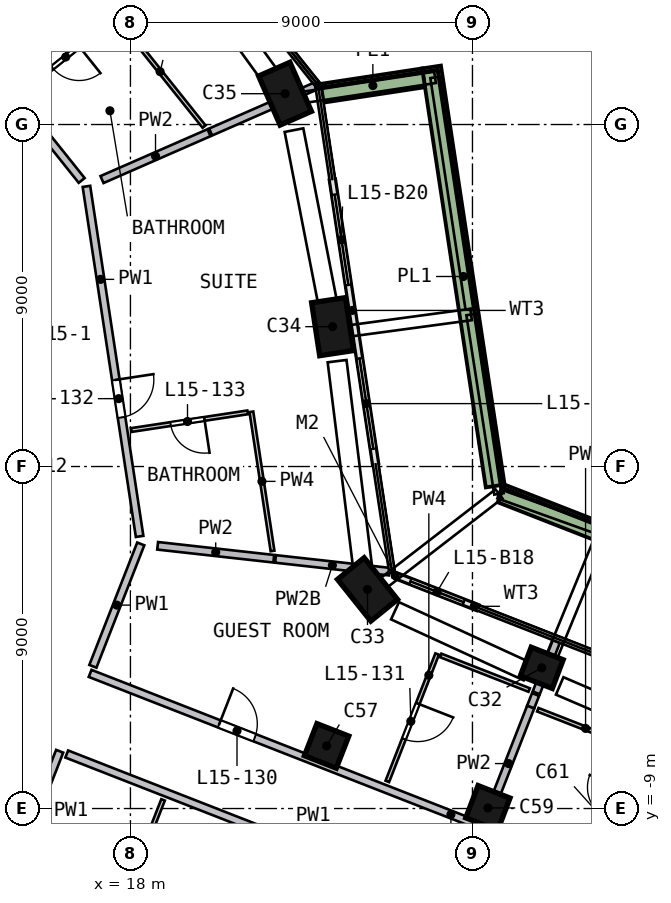
"""IFC4 building model, lengths in metres.
Left out: names, types, materials, properties, quantities, classifications, styles, units other than length and angle.
Written with IfcOpenShell. Run it as: python <this file> out.ifc"""

import sys

from ifc_helpers import new_model, si_unit, direction, frame, frame_2d, origin, origin_2d, place, context, subcontext, project, spatial, rectangle, extrude, element, fill, save


model = new_model("IFC4")
c1 = context("Model", 3, precision=1e-05, world=origin(), true_north=direction((0.0, 1.0)))
c2 = subcontext(c1, "Body", "Model", "MODEL_VIEW")
j1 = project(units=[si_unit("LENGTHUNIT", "METRE"), si_unit("PLANEANGLEUNIT", "RADIAN")], contexts=[c1])
p1 = place(None, origin())
s1 = spatial("IfcSite", under=j1, at=p1, CompositionType="ELEMENT")
p2 = place(p1, origin())
s2 = spatial("IfcBuilding", under=s1, at=p2, CompositionType="ELEMENT")
p3 = place(p2, frame((0.0, 0.0, 68.0)))
s3 = spatial("IfcBuildingStorey", under=s2, at=p3, CompositionType="ELEMENT", Elevation=68.0)
p4 = place(p3, frame((28.861, -5.489, 0.0), z_axis=(-0.030445747, 0.15713934, 0.987107028), x_axis=(-0.932085044, 0.352171112, -0.084811433)))
e1 = element("IfcColumn", 1, at=p4, inside=s3, PredefinedType="COLUMN", context=c2, shape_type="SweptSolid", body=[
    extrude(rectangle(XDim=0.9, YDim=0.8, at=origin_2d()), origin(), (0.0, 0.0, 1.0), 3.232),
])
p5 = place(p3, frame((24.22, -3.373, 0.0), z_axis=(0.015051015, 0.115315096, 0.993214929), x_axis=(0.627855861, -0.774169148, 0.08036883)))
e2 = element("IfcColumn", 2, at=p5, inside=s3, PredefinedType="COLUMN", context=c2, shape_type="SweptSolid", body=[
    extrude(rectangle(XDim=1.4, YDim=0.9, at=origin_2d()), origin(), (0.0, 0.0, 1.0), 3.212),
])
p6 = place(p3, frame((23.34, 3.547, 0.0), z_axis=(-0.01779579, 0.110881458, 0.993674299), x_axis=(-0.149132846, 0.982419922, -0.112296444)))
e3 = element("IfcColumn", 3, at=p6, inside=s3, PredefinedType="COLUMN", context=c2, shape_type="SweptSolid", body=[
    extrude(rectangle(XDim=1.4, YDim=0.9, at=origin_2d()), origin(), (0.0, 0.0, 1.0), 3.21),
])
p7 = place(p3, frame((22.125, 9.684, 0.0), z_axis=(-0.046909277, 0.104842615, 0.993381873), x_axis=(0.397994334, -0.910169761, 0.114854325)))
e4 = element("IfcColumn", 4, at=p7, inside=s3, PredefinedType="COLUMN", context=c2, shape_type="SweptSolid", body=[
    extrude(rectangle(XDim=1.4, YDim=0.9, at=origin_2d()), origin(), (0.0, 0.0, 1.0), 3.211),
])
p8 = place(p3, frame((23.12, -7.485, 0.0), z_axis=(0.034665953, 0.110231649, 0.993301191), x_axis=(0.931623603, -0.363340739, 0.007808335)))
e5 = element("IfcColumn", 5, at=p8, inside=s3, PredefinedType="COLUMN", context=c2, shape_type="SweptSolid", body=[
    extrude(rectangle(XDim=0.9, YDim=0.9, at=origin_2d()), origin(), (0.0, 0.0, 1.0), 3.211),
])
p9 = place(p3, frame((27.422, -9.167, 0.0), z_axis=(-0.013088107, 0.150702368, 0.988492538), x_axis=(0.932639071, -0.354645167, 0.066416633)))
e6 = element("IfcColumn", 6, at=p9, inside=s3, PredefinedType="COLUMN", context=c2, shape_type="SweptSolid", body=[
    extrude(rectangle(XDim=0.9, YDim=0.9, at=origin_2d()), origin(), (0.0, 0.0, 1.0), 3.227),
])
p10 = place(p3, frame((27.139, -3.715, 0.0), z_axis=(0.0, 0.0, 1.0), x_axis=(-0.931325758, 0.364187221, 0.0)))
e7 = element("IfcWall", 7, at=p10, inside=s3, PredefinedType="SOLIDWALL", context=c2, shape_type="SweptSolid", body=[
    extrude(rectangle(XDim=2.3, YDim=0.15, at=frame_2d((1.15, 0.0))), origin(), (0.0, 0.0, 1.0), 2.425),
])
p11 = place(p10, frame((0.4, 0.0, 0.0)))
e8 = element("IfcOpeningElement", 8, at=p11, cuts=e7, PredefinedType="OPENING", context=c2, shape_type="SweptSolid", body=[
    extrude(rectangle(XDim=1.5, YDim=2.4, at=frame_2d((0.75, 1.2))), frame((0.0, 0.085, 0.0), z_axis=(0.0, -1.0, 0.0), x_axis=(1.0, 0.0, 0.0)), (0.0, 0.0, 1.0), 0.17),
])
p12 = place(p3, frame((24.45, 0.074, 0.0), z_axis=(0.0, 0.0, 1.0), x_axis=(-0.150207135, 0.988654549, 0.0)))
e9 = element("IfcWall", 9, at=p12, inside=s3, PredefinedType="SOLIDWALL", context=c2, shape_type="SweptSolid", body=[
    extrude(rectangle(XDim=3.6, YDim=0.15, at=frame_2d((1.8, 0.0))), origin(), (0.0, 0.0, 1.0), 2.425),
])
p13 = place(p12, frame((0.4, 0.0, 0.0)))
e10 = element("IfcOpeningElement", 10, at=p13, cuts=e9, PredefinedType="OPENING", context=c2, shape_type="SweptSolid", body=[
    extrude(rectangle(XDim=2.4, YDim=2.4, at=frame_2d((1.2, 1.2))), frame((0.0, 0.085, 0.0), z_axis=(0.0, -1.0, 0.0), x_axis=(1.0, 0.0, 0.0)), (0.0, 0.0, 1.0), 0.17),
])
p14 = place(p3, frame((23.909, 3.633, 0.0), z_axis=(0.0, 0.0, 1.0), x_axis=(-0.150227192, 0.988651501, 0.0)))
e11 = element("IfcWall", 11, at=p14, inside=s3, PredefinedType="SOLIDWALL", context=c2, shape_type="SweptSolid", body=[
    extrude(rectangle(XDim=3.96, YDim=0.15, at=frame_2d((1.98, 0.0))), origin(), (0.0, 0.0, 1.0), 2.425),
])
p15 = place(p14, frame((1.16, 0.0, 0.0)))
e12 = element("IfcOpeningElement", 12, at=p15, cuts=e11, PredefinedType="OPENING", context=c2, shape_type="SweptSolid", body=[
    extrude(rectangle(XDim=2.4, YDim=2.4, at=frame_2d((1.2, 1.2))), frame((0.0, 0.085, 0.0), z_axis=(0.0, -1.0, 0.0), x_axis=(1.0, 0.0, 0.0)), (0.0, 0.0, 1.0), 0.17),
])
p16 = place(p3, frame((34.172, -3.217, 0.0), z_axis=(0.0, 0.0, 1.0), x_axis=(-0.931303408, 0.364244371, 0.0)))
e13 = element("IfcWall", 13, at=p16, inside=s3, PredefinedType="SOLIDWALL", context=c2, shape_type="SweptSolid", body=[
    extrude(rectangle(XDim=6.89, YDim=0.5, at=frame_2d((3.445, 0.0))), origin(), (0.0, 0.0, 1.0), 0.7),
])
p17 = place(p3, frame((27.598, -0.512, 0.0), z_axis=(0.0, 0.0, 1.0), x_axis=(-0.150217802, 0.988652928, 0.0)))
e14 = element("IfcWall", 14, at=p17, inside=s3, PredefinedType="SOLIDWALL", context=c2, shape_type="SweptSolid", body=[
    extrude(rectangle(XDim=11.152, YDim=0.5, at=frame_2d((5.576, 0.0))), origin(), (0.0, 0.0, 1.0), 0.7),
])
p18 = place(p3, frame((25.713, 10.229, 0.0), z_axis=(0.0, 0.0, 1.0), x_axis=(-0.988647191, -0.150255557, 0.0)))
e15 = element("IfcWall", 15, at=p18, inside=s3, PredefinedType="SOLIDWALL", context=c2, shape_type="SweptSolid", body=[
    extrude(rectangle(XDim=2.699, YDim=0.5, at=frame_2d((1.349, 0.0))), origin(), (0.0, 0.0, 1.0), 0.7),
])
p19 = place(p3, frame((10.9, 14.805, 0.0), z_axis=(0.0, 0.0, 1.0), x_axis=(0.624423357, -0.781086085, 0.0)))
e16 = element("IfcWall", 16, at=p19, inside=s3, PredefinedType="SOLIDWALL", context=c2, shape_type="SweptSolid", body=[
    extrude(rectangle(XDim=9.316, YDim=0.2, at=frame_2d((4.658, 0.0))), origin(), (0.0, 0.0, 1.0), 3.19),
])
p20 = place(p19, frame((5.15, 0.0, 0.0)))
e17 = element("IfcOpeningElement", 17, at=p20, cuts=e16, PredefinedType="OPENING", context=c2, shape_type="SweptSolid", body=[
    extrude(rectangle(XDim=1.0, YDim=2.1, at=frame_2d((0.5, 1.05))), frame((0.0, 0.11, 0.0), z_axis=(0.0, -1.0, 0.0), x_axis=(1.0, 0.0, 0.0)), (0.0, 0.0, 1.0), 0.22),
])
p21 = place(p3, frame((14.899, -10.659, 0.0), z_axis=(0.0, 0.0, 1.0), x_axis=(0.364261269, 0.931296799, 0.0)))
e18 = element("IfcWall", 18, at=p21, inside=s3, PredefinedType="SOLIDWALL", context=c2, shape_type="SweptSolid", body=[
    extrude(rectangle(XDim=3.4, YDim=0.2, at=frame_2d((1.7, 0.0))), origin(), (0.0, 0.0, 1.0), 3.19),
])
p22 = place(p3, frame((16.842, 7.372, 0.0), z_axis=(0.0, 0.0, 1.0), x_axis=(0.150231533, -0.988650842, 0.0)))
e19 = element("IfcWall", 19, at=p22, inside=s3, PredefinedType="SOLIDWALL", context=c2, shape_type="SweptSolid", body=[
    extrude(rectangle(XDim=9.317, YDim=0.2, at=frame_2d((4.658, 0.0))), origin(), (0.0, 0.0, 1.0), 3.19),
])
p23 = place(p22, frame((5.15, 0.0, 0.0)))
e20 = element("IfcOpeningElement", 20, at=p23, cuts=e19, PredefinedType="OPENING", context=c2, shape_type="SweptSolid", body=[
    extrude(rectangle(XDim=1.0, YDim=2.1, at=frame_2d((0.5, 1.05))), frame((0.0, 0.11, 0.0), z_axis=(0.0, -1.0, 0.0), x_axis=(1.0, 0.0, 0.0)), (0.0, 0.0, 1.0), 0.22),
])
p24 = place(p3, frame((17.012, -5.257, 0.0), z_axis=(0.0, 0.0, 1.0), x_axis=(0.364210349, 0.931316714, 0.0)))
e21 = element("IfcWall", 21, at=p24, inside=s3, PredefinedType="SOLIDWALL", context=c2, shape_type="SweptSolid", body=[
    extrude(rectangle(XDim=3.458, YDim=0.2, at=frame_2d((1.729, 0.0))), origin(), (0.0, 0.0, 1.0), 3.19),
])
p25 = place(p3, frame((30.795, -13.225, 0.0), z_axis=(0.0, 0.0, 1.0), x_axis=(-0.931306749, 0.364235828, 0.0)))
e22 = element("IfcWall", 22, at=p25, inside=s3, PredefinedType="SOLIDWALL", context=c2, shape_type="SweptSolid", body=[
    extrude(rectangle(XDim=15.538, YDim=0.2, at=frame_2d((7.769, 0.0))), origin(), (0.0, 0.0, 1.0), 3.19),
])
p26 = place(p25, frame((1.8, 0.0, 0.0)))
e23 = element("IfcOpeningElement", 23, at=p26, cuts=e22, PredefinedType="OPENING", context=c2, shape_type="SweptSolid", body=[
    extrude(rectangle(XDim=1.0, YDim=2.1, at=frame_2d((0.5, 1.05))), frame((0.0, 0.11, 0.0), z_axis=(0.0, -1.0, 0.0), x_axis=(1.0, 0.0, 0.0)), (0.0, 0.0, 1.0), 0.22),
])
p27 = place(p3, frame((16.939, -5.444, 0.0), z_axis=(0.0, 0.0, 1.0), x_axis=(0.931312079, -0.3642222, 0.0)))
e24 = element("IfcWall", 24, at=p27, inside=s3, PredefinedType="SOLIDWALL", context=c2, shape_type="SweptSolid", body=[
    extrude(rectangle(XDim=15.538, YDim=0.2, at=frame_2d((7.769, 0.0))), origin(), (0.0, 0.0, 1.0), 3.19),
])
p28 = place(p27, frame((3.65, 0.0, 0.0)))
e25 = element("IfcOpeningElement", 25, at=p28, cuts=e24, PredefinedType="OPENING", context=c2, shape_type="SweptSolid", body=[
    extrude(rectangle(XDim=1.0, YDim=2.1, at=frame_2d((0.5, 1.05))), frame((0.0, 0.11, 0.0), z_axis=(0.0, -1.0, 0.0), x_axis=(1.0, 0.0, 0.0)), (0.0, 0.0, 1.0), 0.22),
])
p29 = place(p3, frame((17.252, 7.552, 0.0), z_axis=(0.0, 0.0, 1.0), x_axis=(0.916111768, 0.400922971, 0.0)))
e26 = element("IfcWall", 26, at=p29, inside=s3, PredefinedType="SOLIDWALL", context=c2, shape_type="SweptSolid", body=[
    extrude(rectangle(XDim=3.074, YDim=0.2, at=frame_2d((1.537, 0.0))), origin(), (0.0, 0.0, 1.0), 3.19),
])
p30 = place(p3, frame((18.716, -2.086, 0.0), z_axis=(0.0, 0.0, 1.0), x_axis=(0.993846884, -0.110762675, 0.0)))
e27 = element("IfcWall", 27, at=p30, inside=s3, PredefinedType="SOLIDWALL", context=c2, shape_type="SweptSolid", body=[
    extrude(rectangle(XDim=3.075, YDim=0.2, at=frame_2d((1.537, 0.0))), origin(), (0.0, 0.0, 1.0), 3.19),
])
p31 = place(p3, frame((20.11, 8.803, 0.0), z_axis=(0.0, 0.0, 1.0), x_axis=(0.91609034, 0.400971931, 0.0)))
e28 = element("IfcWall", 28, at=p31, inside=s3, PredefinedType="SOLIDWALL", context=c2, shape_type="SweptSolid", body=[
    extrude(rectangle(XDim=3.011, YDim=0.2, at=frame_2d((1.506, 0.0))), origin(), (0.0, 0.0, 1.0), 3.19),
])
p32 = place(p3, frame((21.817, -2.432, 0.0), z_axis=(0.0, 0.0, 1.0), x_axis=(0.993849082, -0.110742952, 0.0)))
e29 = element("IfcWall", 29, at=p32, inside=s3, PredefinedType="SOLIDWALL", context=c2, shape_type="SweptSolid", body=[
    extrude(rectangle(XDim=3.011, YDim=0.2, at=frame_2d((1.506, 0.0))), origin(), (0.0, 0.0, 1.0), 2.69),
])
p33 = place(p3, frame((27.367, -9.307, 0.0), z_axis=(0.0, 0.0, 1.0), x_axis=(0.364223868, 0.931311427, 0.0)))
e30 = element("IfcWall", 30, at=p33, inside=s3, PredefinedType="SOLIDWALL", context=c2, shape_type="SweptSolid", body=[
    extrude(rectangle(XDim=3.2, YDim=0.2, at=frame_2d((1.6, 0.0))), origin(), (0.0, 0.0, 1.0), 3.19),
])
p34 = place(p3, frame((28.533, -6.327, 0.0), z_axis=(0.0, 0.0, 1.0), x_axis=(0.364320852, 0.931273492, 0.0)))
e31 = element("IfcWall", 31, at=p34, inside=s3, PredefinedType="SOLIDWALL", context=c2, shape_type="SweptSolid", body=[
    extrude(rectangle(XDim=0.352, YDim=0.2, at=frame_2d((0.176, 0.0))), origin(), (0.0, 0.0, 1.0), 3.19),
])
p35 = place(p3, frame((28.678, -5.956, 0.0), z_axis=(0.0, 0.0, 1.0), x_axis=(0.36419013, 0.931324621, 0.0)))
e32 = element("IfcWall", 32, at=p35, inside=s3, PredefinedType="SOLIDWALL", context=c2, shape_type="SweptSolid", body=[
    extrude(rectangle(XDim=1.452, YDim=0.2, at=frame_2d((0.726, 0.0))), origin(), (0.0, 0.0, 1.0), 3.19),
])
p36 = place(p3, frame((17.546, 11.776, 0.0), z_axis=(0.0, 0.0, 1.0), x_axis=(-0.781076214, -0.624435703, 0.0)))
e33 = element("IfcWall", 33, at=p36, inside=s3, PredefinedType="PARTITIONING", context=c2, shape_type="SweptSolid", body=[
    extrude(rectangle(XDim=3.1, YDim=0.1, at=frame_2d((1.55, 0.0))), origin(), (0.0, 0.0, 1.0), 3.19),
])
p37 = place(p36, frame((1.15, 0.0, 0.0)))
e34 = element("IfcOpeningElement", 34, at=p37, cuts=e33, PredefinedType="OPENING", context=c2, shape_type="SweptSolid", body=[
    extrude(rectangle(XDim=0.9, YDim=2.1, at=frame_2d((0.45, 1.05))), frame((0.0, 0.06, 0.0), z_axis=(0.0, -1.0, 0.0), x_axis=(1.0, 0.0, 0.0)), (0.0, 0.0, 1.0), 0.12),
])
p38 = place(p3, frame((17.693, -11.752, 0.0), z_axis=(0.0, 0.0, 1.0), x_axis=(0.364223868, 0.931311427, 0.0)))
e35 = element("IfcWall", 35, at=p38, inside=s3, PredefinedType="PARTITIONING", context=c2, shape_type="SweptSolid", body=[
    extrude(rectangle(XDim=3.2, YDim=0.1, at=frame_2d((1.6, 0.0))), origin(), (0.0, 0.0, 1.0), 3.19),
])
p39 = place(p38, frame((1.25, 0.0, 0.0)))
e36 = element("IfcOpeningElement", 36, at=p39, cuts=e35, PredefinedType="OPENING", context=c2, shape_type="SweptSolid", body=[
    extrude(rectangle(XDim=0.9, YDim=2.1, at=frame_2d((0.45, 1.05))), frame((0.0, 0.06, 0.0), z_axis=(0.0, -1.0, 0.0), x_axis=(1.0, 0.0, 0.0)), (0.0, 0.0, 1.0), 0.12),
])
p40 = place(p3, frame((17.625, 11.838, 0.0), z_axis=(0.0, 0.0, 1.0), x_axis=(0.624413662, -0.781093835, 0.0)))
e37 = element("IfcWall", 37, at=p40, inside=s3, PredefinedType="PARTITIONING", context=c2, shape_type="SweptSolid", body=[
    extrude(rectangle(XDim=3.704, YDim=0.1, at=frame_2d((1.852, 0.0))), origin(), (0.0, 0.0, 1.0), 3.19),
])
p41 = place(p3, frame((21.083, 1.425, 0.0), z_axis=(0.0, 0.0, 1.0), x_axis=(-0.988656748, -0.150192657, 0.0)))
e38 = element("IfcWall", 38, at=p41, inside=s3, PredefinedType="PARTITIONING", context=c2, shape_type="SweptSolid", body=[
    extrude(rectangle(XDim=3.1, YDim=0.1, at=frame_2d((1.55, 0.0))), origin(), (0.0, 0.0, 1.0), 3.19),
])
p42 = place(p41, frame((1.15, 0.0, 0.0)))
e39 = element("IfcOpeningElement", 39, at=p42, cuts=e38, PredefinedType="OPENING", context=c2, shape_type="SweptSolid", body=[
    extrude(rectangle(XDim=0.9, YDim=2.1, at=frame_2d((0.45, 1.05))), frame((0.0, 0.06, 0.0), z_axis=(0.0, -1.0, 0.0), x_axis=(1.0, 0.0, 0.0)), (0.0, 0.0, 1.0), 0.12),
])
p43 = place(p3, frame((21.182, 1.44, 0.0), z_axis=(0.0, 0.0, 1.0), x_axis=(0.150219315, -0.988652698, 0.0)))
e40 = element("IfcWall", 40, at=p43, inside=s3, PredefinedType="PARTITIONING", context=c2, shape_type="SweptSolid", body=[
    extrude(rectangle(XDim=3.704, YDim=0.1, at=frame_2d((1.852, 0.0))), origin(), (0.0, 0.0, 1.0), 3.19),
])
p44 = place(p3, frame((26.071, -4.935, 0.0), z_axis=(0.0, 0.0, 1.0), x_axis=(-0.364235697, -0.931306801, 0.0)))
e41 = element("IfcWall", 41, at=p44, inside=s3, PredefinedType="PARTITIONING", context=c2, shape_type="SweptSolid", body=[
    extrude(rectangle(XDim=3.6, YDim=0.1, at=frame_2d((1.8, 0.0))), origin(), (0.0, 0.0, 1.0), 3.19),
])
p45 = place(p44, frame((1.4, 0.0, 0.0)))
e42 = element("IfcOpeningElement", 42, at=p45, cuts=e41, PredefinedType="OPENING", context=c2, shape_type="SweptSolid", body=[
    extrude(rectangle(XDim=1.0, YDim=2.1, at=frame_2d((0.5, 1.05))), frame((0.0, 0.06, 0.0), z_axis=(0.0, -1.0, 0.0), x_axis=(1.0, 0.0, 0.0)), (0.0, 0.0, 1.0), 0.12),
])
p46 = place(p3, frame((26.164, -4.971, 0.0), z_axis=(0.0, 0.0, 1.0), x_axis=(0.931304719, -0.364241019, 0.0)))
e43 = element("IfcWall", 43, at=p46, inside=s3, PredefinedType="PARTITIONING", context=c2, shape_type="SweptSolid", body=[
    extrude(rectangle(XDim=2.5, YDim=0.1, at=frame_2d((1.25, 0.0))), origin(), (0.0, 0.0, 1.0), 3.19),
])
p47 = place(p3, frame((31.233, -7.383, 0.0), z_axis=(0.0, 0.0, 1.0), x_axis=(-0.931305472, 0.364239095, 0.0)))
e44 = element("IfcWall", 44, at=p47, inside=s3, PredefinedType="PARTITIONING", context=c2, shape_type="SweptSolid", body=[
    extrude(rectangle(XDim=2.7, YDim=0.1, at=frame_2d((1.35, 0.0))), origin(), (0.0, 0.0, 1.0), 3.19),
])
p48 = place(p11, origin())
e45 = element("IfcDoor", 45, at=p48, inside=s3, OperationType="SLIDING_TO_RIGHT", PredefinedType="DOOR", context=c2, shape_type="SweptSolid", body=[
    extrude(rectangle(XDim=1.5, YDim=2.4, at=frame_2d((0.75, 1.2))), frame((0.0, 0.025, 0.0), z_axis=(0.0, -1.0, 0.0), x_axis=(1.0, 0.0, 0.0)), (0.0, 0.0, 1.0), 0.05),
])
fill(e8, e45)
p49 = place(p13, origin())
e46 = element("IfcDoor", 46, at=p49, inside=s3, OperationType="SLIDING_TO_RIGHT", PredefinedType="DOOR", context=c2, shape_type="SweptSolid", body=[
    extrude(rectangle(XDim=2.4, YDim=2.4, at=frame_2d((1.2, 1.2))), frame((0.0, 0.025, 0.0), z_axis=(0.0, -1.0, 0.0), x_axis=(1.0, 0.0, 0.0)), (0.0, 0.0, 1.0), 0.05),
])
fill(e10, e46)
p50 = place(p15, origin())
e47 = element("IfcDoor", 47, at=p50, inside=s3, OperationType="SLIDING_TO_LEFT", PredefinedType="DOOR", context=c2, shape_type="SweptSolid", body=[
    extrude(rectangle(XDim=2.4, YDim=2.4, at=frame_2d((1.2, 1.2))), frame((0.0, 0.025, 0.0), z_axis=(0.0, -1.0, 0.0), x_axis=(1.0, 0.0, 0.0)), (0.0, 0.0, 1.0), 0.05),
])
fill(e12, e47)
p51 = place(p28, origin())
e48 = element("IfcDoor", 48, at=p51, inside=s3, OperationType="SINGLE_SWING_LEFT", PredefinedType="DOOR", context=c2, shape_type="SweptSolid", body=[
    extrude(rectangle(XDim=1.0, YDim=2.1, at=frame_2d((0.5, 1.05))), frame((0.0, 0.025, 0.0), z_axis=(0.0, -1.0, 0.0), x_axis=(1.0, 0.0, 0.0)), (0.0, 0.0, 1.0), 0.05),
])
fill(e25, e48)
p52 = place(p45, origin())
e49 = element("IfcDoor", 49, at=p52, inside=s3, OperationType="SINGLE_SWING_LEFT", PredefinedType="DOOR", context=c2, shape_type="SweptSolid", body=[
    extrude(rectangle(XDim=1.0, YDim=2.1, at=frame_2d((0.5, 1.05))), frame((0.0, 0.025, 0.0), z_axis=(0.0, -1.0, 0.0), x_axis=(1.0, 0.0, 0.0)), (0.0, 0.0, 1.0), 0.05),
])
fill(e42, e49)
p53 = place(p23, origin())
e50 = element("IfcDoor", 50, at=p53, inside=s3, OperationType="SINGLE_SWING_LEFT", PredefinedType="DOOR", context=c2, shape_type="SweptSolid", body=[
    extrude(rectangle(XDim=1.0, YDim=2.1, at=frame_2d((0.5, 1.05))), frame((0.0, 0.025, 0.0), z_axis=(0.0, -1.0, 0.0), x_axis=(1.0, 0.0, 0.0)), (0.0, 0.0, 1.0), 0.05),
])
fill(e20, e50)
p54 = place(p42, origin())
e51 = element("IfcDoor", 51, at=p54, inside=s3, OperationType="SINGLE_SWING_LEFT", PredefinedType="DOOR", context=c2, shape_type="SweptSolid", body=[
    extrude(rectangle(XDim=0.9, YDim=2.1, at=frame_2d((0.45, 1.05))), frame((0.0, 0.025, 0.0), z_axis=(0.0, -1.0, 0.0), x_axis=(1.0, 0.0, 0.0)), (0.0, 0.0, 1.0), 0.05),
])
fill(e39, e51)
p55 = place(p37, origin())
e52 = element("IfcDoor", 52, at=p55, inside=s3, OperationType="SINGLE_SWING_LEFT", PredefinedType="DOOR", context=c2, shape_type="SweptSolid", body=[
    extrude(rectangle(XDim=0.9, YDim=2.1, at=frame_2d((0.45, 1.05))), frame((0.0, 0.025, 0.0), z_axis=(0.0, -1.0, 0.0), x_axis=(1.0, 0.0, 0.0)), (0.0, 0.0, 1.0), 0.05),
])
fill(e34, e52)
save(model, sys.argv[1])
